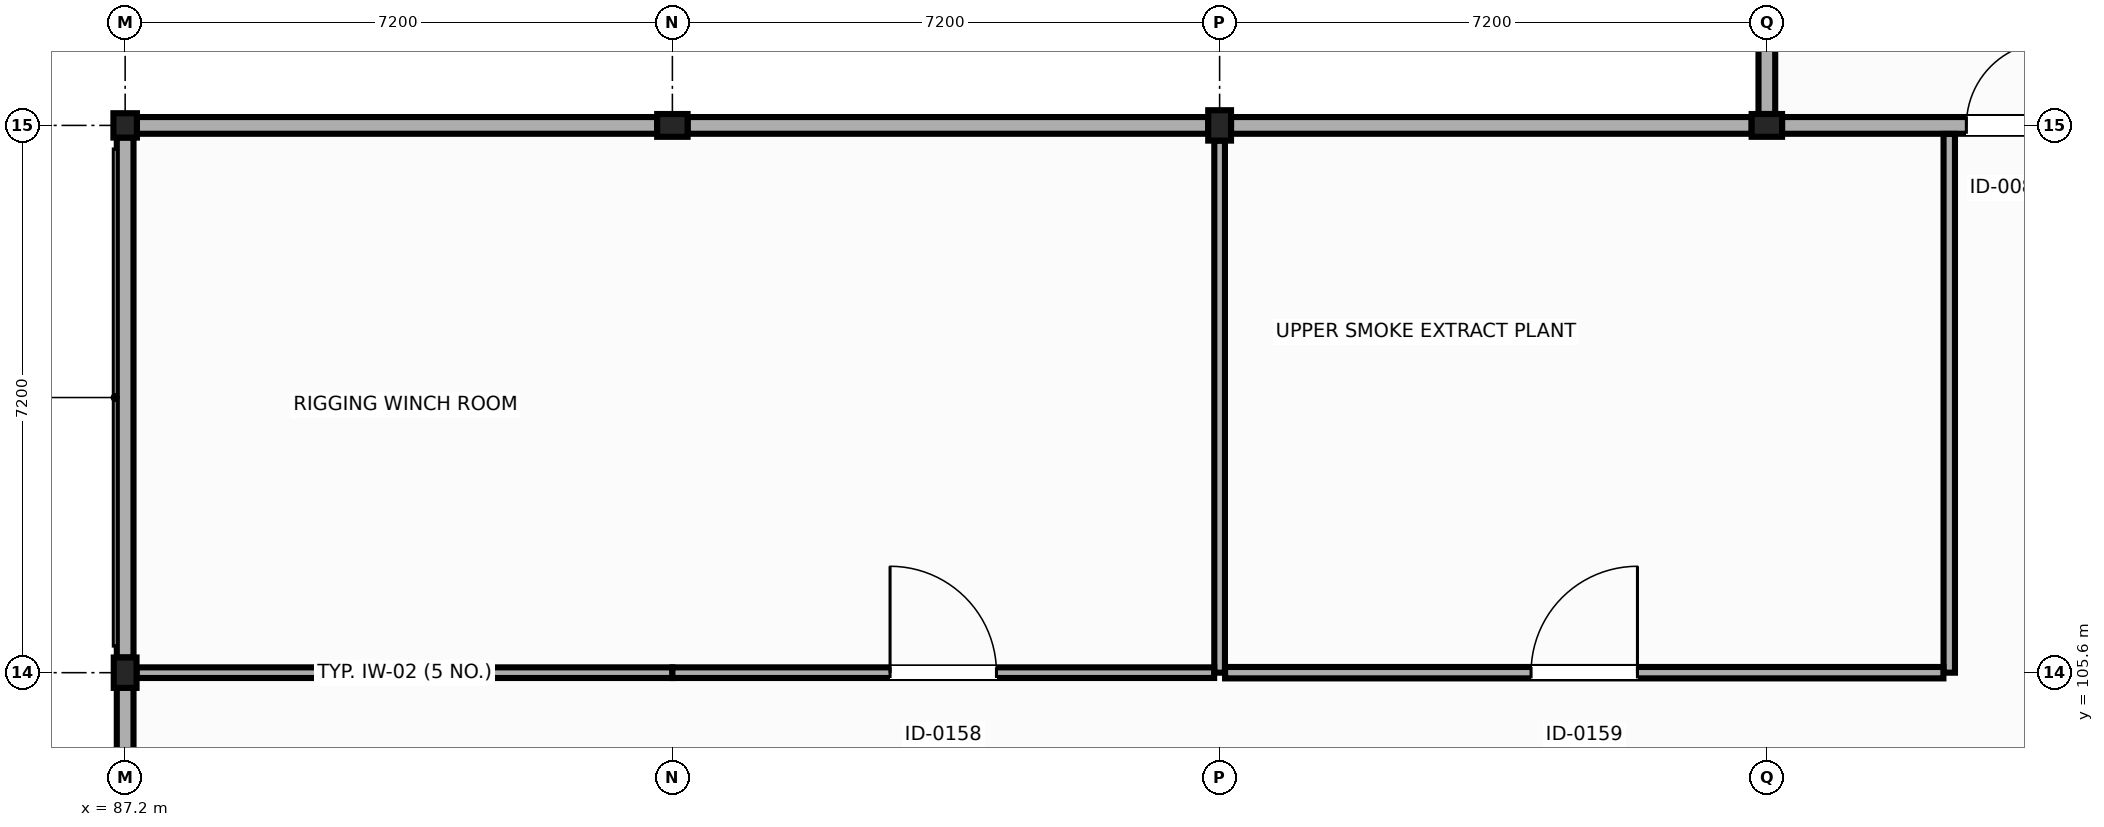
"""IFC4 building model, lengths in metres.
Left out: names, types, materials, properties, quantities, classifications, styles, units other than length and angle.
Written with IfcOpenShell. Run it as: python <this file> out.ifc"""

import sys

from ifc_helpers import new_model, si_unit, direction, frame, frame_2d, origin, origin_2d, place, context, subcontext, project, spatial, rectangle, i_section, extrude, element, fill, save


model = new_model("IFC4")
c1 = context("Model", 3, precision=1e-05, world=origin(), true_north=direction((0.0, 1.0)))
c2 = subcontext(c1, "Body", "Model", "MODEL_VIEW")
j1 = project(units=[si_unit("LENGTHUNIT", "METRE"), si_unit("PLANEANGLEUNIT", "RADIAN")], contexts=[c1])
p1 = place(None, origin())
s1 = spatial("IfcSite", under=j1, at=p1, CompositionType="ELEMENT")
p2 = place(p1, origin())
s2 = spatial("IfcBuilding", under=s1, at=p2, CompositionType="ELEMENT")
p3 = place(p2, frame((0.0, 0.0, 23.1)))
s3 = spatial("IfcBuildingStorey", under=s2, at=p3, CompositionType="ELEMENT", Elevation=23.1)
p4 = place(p3, frame((87.2, 105.6, 0.0), z_axis=(0.0, 0.0, 1.0), x_axis=(1.0, 0.0, 0.0)))
e1 = element("IfcColumn", 1, at=p4, inside=s3, PredefinedType="COLUMN", context=c2, shape_type="SweptSolid", body=[
    extrude(i_section(OverallWidth=0.3, OverallDepth=0.4, WebThickness=0.013, FlangeThickness=0.024, at=origin_2d()), origin(), (0.0, 0.0, 1.0), 4.2),
])
p5 = place(p3, frame((87.2, 112.8, 0.0), z_axis=(0.0, 0.0, 1.0), x_axis=(1.0, 0.0, 0.0)))
e2 = element("IfcColumn", 2, at=p5, inside=s3, PredefinedType="COLUMN", context=c2, shape_type="SweptSolid", body=[
    extrude(i_section(OverallWidth=0.309, OverallDepth=0.321, WebThickness=0.014, FlangeThickness=0.022, at=origin_2d()), origin(), (0.0, 0.0, 1.0), 4.2),
])
p6 = place(p3, frame((94.4, 112.8, 0.0), z_axis=(0.0, 0.0, 1.0), x_axis=(0.0, 1.0, 0.0)))
e3 = element("IfcColumn", 3, at=p6, inside=s3, PredefinedType="COLUMN", context=c2, shape_type="SweptSolid", body=[
    extrude(i_section(OverallWidth=0.3, OverallDepth=0.4, WebThickness=0.013, FlangeThickness=0.024, at=origin_2d()), origin(), (0.0, 0.0, 1.0), 7.804),
])
p7 = place(p3, frame((101.6, 112.8, 0.0), z_axis=(0.0, 0.0, 1.0), x_axis=(1.0, 0.0, 0.0)))
e4 = element("IfcColumn", 4, at=p7, inside=s3, PredefinedType="COLUMN", context=c2, shape_type="SweptSolid", body=[
    extrude(i_section(OverallWidth=0.3, OverallDepth=0.4, WebThickness=0.013, FlangeThickness=0.024, at=origin_2d()), origin(), (0.0, 0.0, 1.0), 7.538),
])
p8 = place(p3, frame((108.8, 112.8, 0.0), z_axis=(0.0, 0.0, 1.0), x_axis=(0.0, 1.0, 0.0)))
e5 = element("IfcColumn", 5, at=p8, inside=s3, PredefinedType="COLUMN", context=c2, shape_type="SweptSolid", body=[
    extrude(i_section(OverallWidth=0.3, OverallDepth=0.4, WebThickness=0.013, FlangeThickness=0.024, at=origin_2d()), origin(), (0.0, 0.0, 1.0), 4.046),
])
p9 = place(p3, frame((87.2, 98.55, 0.0), z_axis=(0.0, 0.0, 1.0), x_axis=(0.0, 1.0, 0.0)))
e6 = element("IfcWall", 6, at=p9, inside=s3, PredefinedType="SOLIDWALL", context=c2, shape_type="SweptSolid", body=[
    extrude(rectangle(XDim=6.85, YDim=0.22, at=frame_2d((3.425, 0.0))), origin(), (0.0, 0.0, 1.0), 4.2),
])
p10 = place(p3, frame((87.2, 105.8, 0.0), z_axis=(0.0, 0.0, 1.0), x_axis=(0.0, 1.0, 0.0)))
e7 = element("IfcWall", 7, at=p10, inside=s3, PredefinedType="SOLIDWALL", context=c2, shape_type="SweptSolid", body=[
    extrude(rectangle(XDim=6.84, YDim=0.22, at=frame_2d((3.42, 0.0))), origin(), (0.0, 0.0, 1.0), 4.2),
])
p11 = place(p3, frame((87.354, 112.8, 0.0), z_axis=(0.0, 0.0, 1.0), x_axis=(1.0, 0.0, 0.0)))
e8 = element("IfcWall", 8, at=p11, inside=s3, PredefinedType="SOLIDWALL", context=c2, shape_type="SweptSolid", body=[
    extrude(rectangle(XDim=6.845, YDim=0.22, at=frame_2d((3.423, 0.0))), origin(), (0.0, 0.0, 1.0), 4.2),
])
p12 = place(p3, frame((94.6, 112.8, 0.0), z_axis=(0.0, 0.0, 1.0), x_axis=(1.0, 0.0, 0.0)))
e9 = element("IfcWall", 9, at=p12, inside=s3, PredefinedType="SOLIDWALL", context=c2, shape_type="SweptSolid", body=[
    extrude(rectangle(XDim=6.85, YDim=0.22, at=frame_2d((3.425, 0.0))), origin(), (0.0, 0.0, 1.0), 4.2),
])
p13 = place(p3, frame((101.75, 112.8, 0.0), z_axis=(0.0, 0.0, 1.0), x_axis=(1.0, 0.0, 0.0)))
e10 = element("IfcWall", 10, at=p13, inside=s3, PredefinedType="SOLIDWALL", context=c2, shape_type="SweptSolid", body=[
    extrude(rectangle(XDim=6.85, YDim=0.22, at=frame_2d((3.425, 0.0))), origin(), (0.0, 0.0, 1.0), 4.2),
])
p14 = place(p3, frame((109.0, 112.8, 0.0), z_axis=(0.0, 0.0, 1.0), x_axis=(1.0, 0.0, 0.0)))
e11 = element("IfcWall", 11, at=p14, inside=s3, PredefinedType="SOLIDWALL", context=c2, shape_type="SweptSolid", body=[
    extrude(rectangle(XDim=5.95, YDim=0.22, at=frame_2d((2.975, 0.0))), origin(), (0.0, 0.0, 1.0), 4.046),
])
p15 = place(p14, frame((2.425, 0.0, 0.0)))
e12 = element("IfcOpeningElement", 12, at=p15, cuts=e11, PredefinedType="OPENING", context=c2, shape_type="SweptSolid", body=[
    extrude(rectangle(XDim=1.1, YDim=2.15, at=frame_2d((0.55, 1.075))), frame((0.0, 0.12, 0.0), z_axis=(0.0, -1.0, 0.0), x_axis=(1.0, 0.0, 0.0)), (0.0, 0.0, 1.0), 0.24),
])
p16 = place(p3, frame((108.8, 112.95, 0.0), z_axis=(0.0, 0.0, 1.0), x_axis=(0.0, 1.0, 0.0)))
e13 = element("IfcWall", 13, at=p16, inside=s3, PredefinedType="SOLIDWALL", context=c2, shape_type="SweptSolid", body=[
    extrude(rectangle(XDim=6.75, YDim=0.22, at=frame_2d((3.375, 0.0))), origin(), (0.0, 0.0, 1.0), 3.656),
])
p17 = place(p3, frame((101.6, 105.6, 0.0), z_axis=(0.0, 0.0, 1.0), x_axis=(0.0, 1.0, 0.0)))
e14 = element("IfcWall", 14, at=p17, inside=s3, PredefinedType="PARTITIONING", context=c2, shape_type="SweptSolid", body=[
    extrude(rectangle(XDim=7.0, YDim=0.14, at=frame_2d((3.5, 0.0))), origin(), (0.0, 0.0, 1.0), 3.88),
])
p18 = place(p3, frame((87.35, 105.6, 0.0), z_axis=(0.0, 0.0, 1.0), x_axis=(1.0, 0.0, 0.0)))
e15 = element("IfcWall", 15, at=p18, inside=s3, PredefinedType="PARTITIONING", context=c2, shape_type="SweptSolid", body=[
    extrude(rectangle(XDim=7.05, YDim=0.14, at=frame_2d((3.525, 0.0))), origin(), (0.0, 0.0, 1.0), 3.88),
])
p19 = place(p3, frame((94.4, 105.6, 0.0), z_axis=(0.0, 0.0, 1.0), x_axis=(1.0, 0.0, 0.0)))
e16 = element("IfcWall", 16, at=p19, inside=s3, PredefinedType="PARTITIONING", context=c2, shape_type="SweptSolid", body=[
    extrude(rectangle(XDim=7.128, YDim=0.14, at=frame_2d((3.564, 0.0))), origin(), (0.0, 0.0, 1.0), 3.88),
])
p20 = place(p19, frame((2.864, 0.0, 0.0)))
e17 = element("IfcOpeningElement", 17, at=p20, cuts=e16, PredefinedType="OPENING", context=c2, shape_type="SweptSolid", body=[
    extrude(rectangle(XDim=1.4, YDim=2.2, at=frame_2d((0.7, 1.1))), frame((0.0, 0.08, 0.0), z_axis=(0.0, -1.0, 0.0), x_axis=(1.0, 0.0, 0.0)), (0.0, 0.0, 1.0), 0.16),
])
p21 = place(p3, frame((111.2, 105.6, 0.0), z_axis=(0.0, 0.0, 1.0), x_axis=(0.0, 1.0, 0.0)))
e18 = element("IfcWall", 18, at=p21, inside=s3, PredefinedType="PARTITIONING", context=c2, shape_type="SweptSolid", body=[
    extrude(rectangle(XDim=7.088, YDim=0.15, at=frame_2d((3.544, 0.0))), origin(), (0.0, 0.0, 1.0), 3.88),
])
p22 = place(p3, frame((101.672, 105.6, 0.0), z_axis=(0.0, 0.0, 1.0), x_axis=(1.0, 0.0, 0.0)))
e19 = element("IfcWall", 19, at=p22, inside=s3, PredefinedType="PARTITIONING", context=c2, shape_type="SweptSolid", body=[
    extrude(rectangle(XDim=9.451, YDim=0.15, at=frame_2d((4.726, 0.0))), origin(), (0.0, 0.0, 1.0), 3.88),
])
p23 = place(p22, frame((4.025, 0.0, 0.0)))
e20 = element("IfcOpeningElement", 20, at=p23, cuts=e19, PredefinedType="OPENING", context=c2, shape_type="SweptSolid", body=[
    extrude(rectangle(XDim=1.4, YDim=2.2, at=frame_2d((0.7, 1.1))), frame((0.0, 0.085, 0.0), z_axis=(0.0, -1.0, 0.0), x_axis=(1.0, 0.0, 0.0)), (0.0, 0.0, 1.0), 0.17),
])
p24 = place(p15, origin())
e21 = element("IfcDoor", 21, at=p24, inside=s3, OperationType="SINGLE_SWING_RIGHT", PredefinedType="DOOR", context=c2, shape_type="SweptSolid", body=[
    extrude(rectangle(XDim=1.1, YDim=2.15, at=frame_2d((0.55, 1.075))), frame((0.0, 0.025, 0.0), z_axis=(0.0, -1.0, 0.0), x_axis=(1.0, 0.0, 0.0)), (0.0, 0.0, 1.0), 0.05),
])
fill(e12, e21)
p25 = place(p20, origin())
e22 = element("IfcDoor", 22, at=p25, inside=s3, OperationType="SINGLE_SWING_LEFT", PredefinedType="DOOR", context=c2, shape_type="SweptSolid", body=[
    extrude(rectangle(XDim=1.4, YDim=2.2, at=frame_2d((0.7, 1.1))), frame((0.0, 0.025, 0.0), z_axis=(0.0, -1.0, 0.0), x_axis=(1.0, 0.0, 0.0)), (0.0, 0.0, 1.0), 0.05),
])
fill(e17, e22)
p26 = place(p23, origin())
e23 = element("IfcDoor", 23, at=p26, inside=s3, OperationType="SINGLE_SWING_RIGHT", PredefinedType="DOOR", context=c2, shape_type="SweptSolid", body=[
    extrude(rectangle(XDim=1.4, YDim=2.2, at=frame_2d((0.7, 1.1))), frame((0.0, 0.025, 0.0), z_axis=(0.0, -1.0, 0.0), x_axis=(1.0, 0.0, 0.0)), (0.0, 0.0, 1.0), 0.05),
])
fill(e20, e23)
save(model, sys.argv[1])
